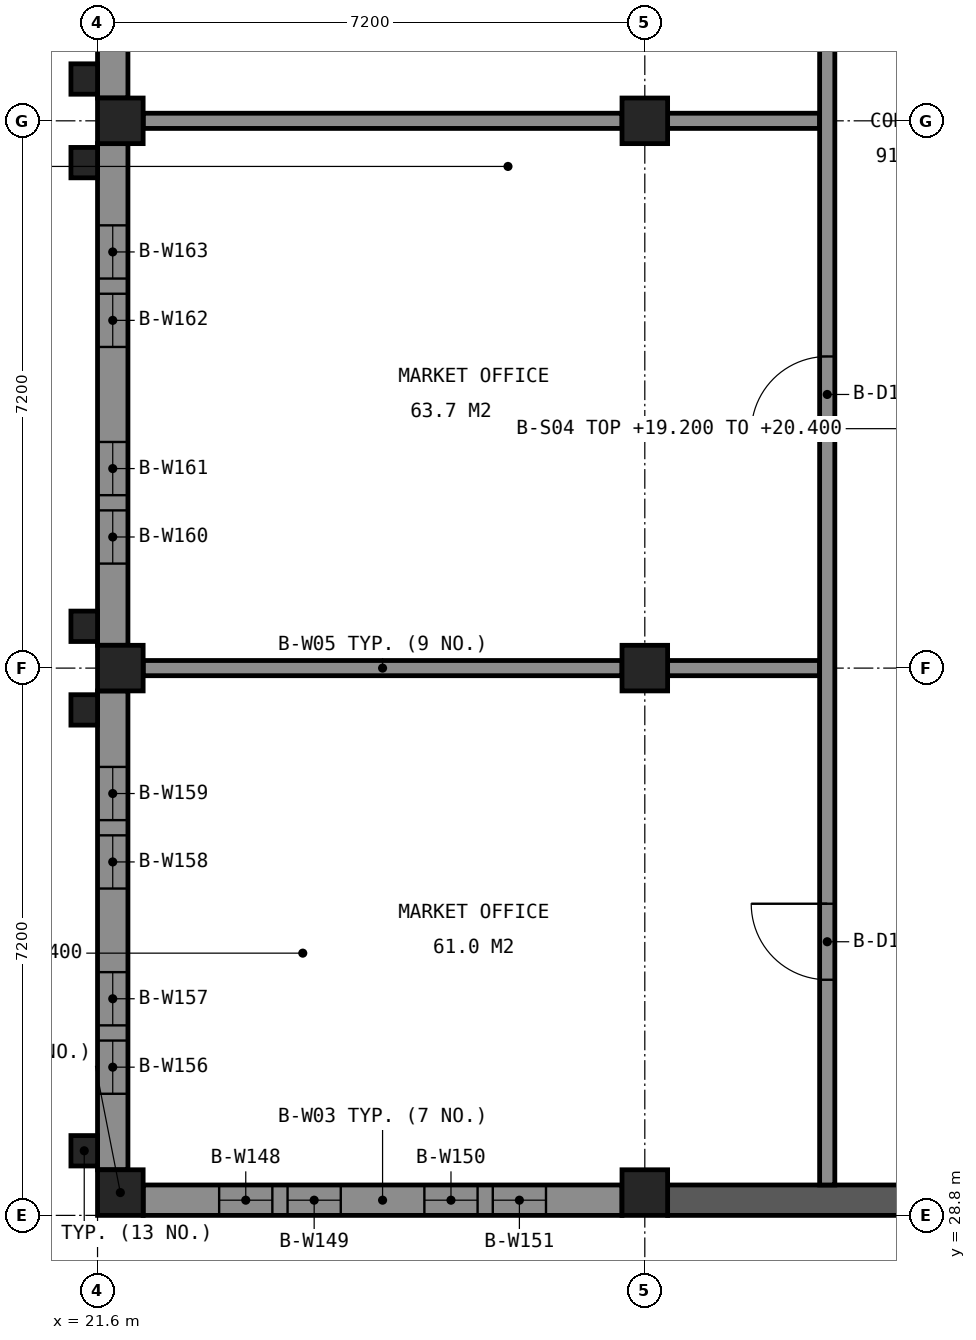
"""IFC4 building model, lengths in metres.
Left out: names, types, materials, properties, quantities, classifications, styles, units other than length and angle.
Written with IfcOpenShell. Run it as: python <this file> out.ifc"""

import sys

from ifc_helpers import new_model, si_unit, direction, frame, frame_2d, origin, origin_2d, place, context, subcontext, project, spatial, polyline, rectangle, outline, extrude, element, fill, save


model = new_model("IFC4")
c1 = context("Model", 3, precision=1e-05, world=origin(), true_north=direction((0.0, 1.0)))
c2 = subcontext(c1, "Body", "Model", "MODEL_VIEW")
j1 = project(units=[si_unit("LENGTHUNIT", "METRE"), si_unit("PLANEANGLEUNIT", "RADIAN")], contexts=[c1])
p1 = place(None, origin())
s1 = spatial("IfcSite", under=j1, at=p1, CompositionType="ELEMENT")
p2 = place(p1, origin())
s2 = spatial("IfcBuilding", under=s1, at=p2, CompositionType="ELEMENT")
p3 = place(p2, frame((0.0, 0.0, 14.4)))
s3 = spatial("IfcBuildingStorey", under=s2, at=p3, CompositionType="ELEMENT", Elevation=14.4)
for number, where, z_axis, x_axis in (
    (1, (21.9, 29.1, 0.0), (0.0, 0.0, 1.0), (1.0, 0.0, 0.0)),
    (2, (21.9, 36.0, 0.0), (0.0, 0.0, 1.0), (1.0, 0.0, 0.0)),
    (3, (21.9, 43.2, 0.0), (0.0, 0.0, 1.0), (1.0, 0.0, 0.0)),
):
    element("IfcColumn", number, at=place(p3, frame(where, z_axis=z_axis, x_axis=x_axis)), inside=s3, PredefinedType="COLUMN", context=c2, shape_type="SweptSolid", body=[
        extrude(rectangle(XDim=0.6, YDim=0.6, at=origin_2d()), origin(), (0.0, 0.0, 1.0), 4.144),
    ])
for number, where, z_axis, x_axis in (
    (4, (28.8, 29.1, 0.0), (0.0, 0.0, 1.0), (1.0, 0.0, 0.0)),
    (5, (28.8, 36.0, 0.0), (0.0, 0.0, 1.0), (1.0, 0.0, 0.0)),
    (6, (28.8, 43.2, 0.0), (0.0, 0.0, 1.0), (1.0, 0.0, 0.0)),
):
    element("IfcColumn", number, at=place(p3, frame(where, z_axis=z_axis, x_axis=x_axis)), inside=s3, PredefinedType="COLUMN", context=c2, shape_type="SweptSolid", body=[
        extrude(rectangle(XDim=0.6, YDim=0.6, at=origin_2d()), origin(), (0.0, 0.0, 1.0), 4.911),
    ])
p4 = place(p3, frame((29.1, 29.0, 0.0), z_axis=(0.0, 0.0, 1.0), x_axis=(1.0, 0.0, 0.0)))
e7 = element("IfcWall", 7, at=p4, inside=s3, PredefinedType="SHEAR", context=c2, shape_type="SweptSolid", body=[
    extrude(outline(polyline([(0.0, 0.0), (13.7, 0.0), (13.7, 4.155), (3.3, 5.311), (0.0, 4.944), (0.0, 0.0)])), frame((0.0, 0.2, 0.0), z_axis=(0.0, -1.0, 0.0), x_axis=(1.0, 0.0, 0.0)), (0.0, 0.0, 1.0), 0.4),
])
p5 = place(p3, frame((22.2, 29.0, 0.0), z_axis=(0.0, 0.0, 1.0), x_axis=(1.0, 0.0, 0.0)))
e8 = element("IfcWall", 8, at=p5, inside=s3, PredefinedType="SOLIDWALL", context=c2, shape_type="SweptSolid", body=[
    extrude(outline(polyline([(0.0, 0.0), (6.3, 0.0), (6.3, 4.878), (0.0, 4.177), (0.0, 0.0)])), frame((0.0, 0.2, 0.0), z_axis=(0.0, -1.0, 0.0), x_axis=(1.0, 0.0, 0.0)), (0.0, 0.0, 1.0), 0.4),
])
p6 = place(p5, frame((1.0, 0.0, 1.6)))
e9 = element("IfcOpeningElement", 9, at=p6, cuts=e8, PredefinedType="OPENING", context=c2, shape_type="SweptSolid", body=[
    extrude(rectangle(XDim=0.7, YDim=1.2, at=frame_2d((0.35, 0.6))), frame((0.0, 0.21, 0.0), z_axis=(0.0, -1.0, 0.0), x_axis=(1.0, 0.0, 0.0)), (0.0, 0.0, 1.0), 0.42),
])
p7 = place(p5, frame((1.9, 0.0, 1.6)))
e10 = element("IfcOpeningElement", 10, at=p7, cuts=e8, PredefinedType="OPENING", context=c2, shape_type="SweptSolid", body=[
    extrude(rectangle(XDim=0.7, YDim=1.2, at=frame_2d((0.35, 0.6))), frame((0.0, 0.21, 0.0), z_axis=(0.0, -1.0, 0.0), x_axis=(1.0, 0.0, 0.0)), (0.0, 0.0, 1.0), 0.42),
])
p8 = place(p5, frame((3.7, 0.0, 1.6)))
e11 = element("IfcOpeningElement", 11, at=p8, cuts=e8, PredefinedType="OPENING", context=c2, shape_type="SweptSolid", body=[
    extrude(rectangle(XDim=0.7, YDim=1.2, at=frame_2d((0.35, 0.6))), frame((0.0, 0.21, 0.0), z_axis=(0.0, -1.0, 0.0), x_axis=(1.0, 0.0, 0.0)), (0.0, 0.0, 1.0), 0.42),
])
p9 = place(p5, frame((4.6, 0.0, 1.6)))
e12 = element("IfcOpeningElement", 12, at=p9, cuts=e8, PredefinedType="OPENING", context=c2, shape_type="SweptSolid", body=[
    extrude(rectangle(XDim=0.7, YDim=1.2, at=frame_2d((0.35, 0.6))), frame((0.0, 0.21, 0.0), z_axis=(0.0, -1.0, 0.0), x_axis=(1.0, 0.0, 0.0)), (0.0, 0.0, 1.0), 0.42),
])
p10 = place(p3, frame((21.8, 29.4, 0.0), z_axis=(0.0, 0.0, 1.0), x_axis=(0.0, 1.0, 0.0)))
e13 = element("IfcWall", 13, at=p10, inside=s3, PredefinedType="SOLIDWALL", context=c2, shape_type="SweptSolid", body=[
    extrude(rectangle(XDim=6.3, YDim=0.4, at=frame_2d((3.15, 0.0))), origin(), (0.0, 0.0, 1.0), 4.133),
])
p11 = place(p10, frame((1.0, 0.0, 1.6)))
e14 = element("IfcOpeningElement", 14, at=p11, cuts=e13, PredefinedType="OPENING", context=c2, shape_type="SweptSolid", body=[
    extrude(rectangle(XDim=0.7, YDim=1.2, at=frame_2d((0.35, 0.6))), frame((0.0, 0.21, 0.0), z_axis=(0.0, -1.0, 0.0), x_axis=(1.0, 0.0, 0.0)), (0.0, 0.0, 1.0), 0.42),
])
p12 = place(p10, frame((1.9, 0.0, 1.6)))
e15 = element("IfcOpeningElement", 15, at=p12, cuts=e13, PredefinedType="OPENING", context=c2, shape_type="SweptSolid", body=[
    extrude(rectangle(XDim=0.7, YDim=1.2, at=frame_2d((0.35, 0.6))), frame((0.0, 0.21, 0.0), z_axis=(0.0, -1.0, 0.0), x_axis=(1.0, 0.0, 0.0)), (0.0, 0.0, 1.0), 0.42),
])
p13 = place(p10, frame((3.7, 0.0, 1.6)))
e16 = element("IfcOpeningElement", 16, at=p13, cuts=e13, PredefinedType="OPENING", context=c2, shape_type="SweptSolid", body=[
    extrude(rectangle(XDim=0.7, YDim=1.2, at=frame_2d((0.35, 0.6))), frame((0.0, 0.21, 0.0), z_axis=(0.0, -1.0, 0.0), x_axis=(1.0, 0.0, 0.0)), (0.0, 0.0, 1.0), 0.42),
])
p14 = place(p10, frame((4.6, 0.0, 1.6)))
e17 = element("IfcOpeningElement", 17, at=p14, cuts=e13, PredefinedType="OPENING", context=c2, shape_type="SweptSolid", body=[
    extrude(rectangle(XDim=0.7, YDim=1.2, at=frame_2d((0.35, 0.6))), frame((0.0, 0.21, 0.0), z_axis=(0.0, -1.0, 0.0), x_axis=(1.0, 0.0, 0.0)), (0.0, 0.0, 1.0), 0.42),
])
p15 = place(p3, frame((21.8, 36.3, 0.0), z_axis=(0.0, 0.0, 1.0), x_axis=(0.0, 1.0, 0.0)))
e18 = element("IfcWall", 18, at=p15, inside=s3, PredefinedType="SOLIDWALL", context=c2, shape_type="SweptSolid", body=[
    extrude(rectangle(XDim=6.6, YDim=0.4, at=frame_2d((3.3, 0.0))), origin(), (0.0, 0.0, 1.0), 4.133),
])
p16 = place(p15, frame((1.075, 0.0, 1.6)))
e19 = element("IfcOpeningElement", 19, at=p16, cuts=e18, PredefinedType="OPENING", context=c2, shape_type="SweptSolid", body=[
    extrude(rectangle(XDim=0.7, YDim=1.2, at=frame_2d((0.35, 0.6))), frame((0.0, 0.21, 0.0), z_axis=(0.0, -1.0, 0.0), x_axis=(1.0, 0.0, 0.0)), (0.0, 0.0, 1.0), 0.42),
])
p17 = place(p15, frame((1.975, 0.0, 1.6)))
e20 = element("IfcOpeningElement", 20, at=p17, cuts=e18, PredefinedType="OPENING", context=c2, shape_type="SweptSolid", body=[
    extrude(rectangle(XDim=0.7, YDim=1.2, at=frame_2d((0.35, 0.6))), frame((0.0, 0.21, 0.0), z_axis=(0.0, -1.0, 0.0), x_axis=(1.0, 0.0, 0.0)), (0.0, 0.0, 1.0), 0.42),
])
p18 = place(p15, frame((3.925, 0.0, 1.6)))
e21 = element("IfcOpeningElement", 21, at=p18, cuts=e18, PredefinedType="OPENING", context=c2, shape_type="SweptSolid", body=[
    extrude(rectangle(XDim=0.7, YDim=1.2, at=frame_2d((0.35, 0.6))), frame((0.0, 0.21, 0.0), z_axis=(0.0, -1.0, 0.0), x_axis=(1.0, 0.0, 0.0)), (0.0, 0.0, 1.0), 0.42),
])
p19 = place(p15, frame((4.825, 0.0, 1.6)))
e22 = element("IfcOpeningElement", 22, at=p19, cuts=e18, PredefinedType="OPENING", context=c2, shape_type="SweptSolid", body=[
    extrude(rectangle(XDim=0.7, YDim=1.2, at=frame_2d((0.35, 0.6))), frame((0.0, 0.21, 0.0), z_axis=(0.0, -1.0, 0.0), x_axis=(1.0, 0.0, 0.0)), (0.0, 0.0, 1.0), 0.42),
])
p20 = place(p3, frame((21.8, 43.5, 0.0), z_axis=(0.0, 0.0, 1.0), x_axis=(0.0, 1.0, 0.0)))
e23 = element("IfcWall", 23, at=p20, inside=s3, PredefinedType="SOLIDWALL", context=c2, shape_type="SweptSolid", body=[
    extrude(rectangle(XDim=6.6, YDim=0.4, at=frame_2d((3.3, 0.0))), origin(), (0.0, 0.0, 1.0), 4.133),
])
p21 = place(p20, frame((1.075, 0.0, 1.6)))
e24 = element("IfcOpeningElement", 24, at=p21, cuts=e23, PredefinedType="OPENING", context=c2, shape_type="SweptSolid", body=[
    extrude(rectangle(XDim=0.7, YDim=1.2, at=frame_2d((0.35, 0.6))), frame((0.0, 0.21, 0.0), z_axis=(0.0, -1.0, 0.0), x_axis=(1.0, 0.0, 0.0)), (0.0, 0.0, 1.0), 0.42),
])
p22 = place(p20, frame((1.975, 0.0, 1.6)))
e25 = element("IfcOpeningElement", 25, at=p22, cuts=e23, PredefinedType="OPENING", context=c2, shape_type="SweptSolid", body=[
    extrude(rectangle(XDim=0.7, YDim=1.2, at=frame_2d((0.35, 0.6))), frame((0.0, 0.21, 0.0), z_axis=(0.0, -1.0, 0.0), x_axis=(1.0, 0.0, 0.0)), (0.0, 0.0, 1.0), 0.42),
])
p23 = place(p20, frame((3.925, 0.0, 1.6)))
e26 = element("IfcOpeningElement", 26, at=p23, cuts=e23, PredefinedType="OPENING", context=c2, shape_type="SweptSolid", body=[
    extrude(rectangle(XDim=0.7, YDim=1.2, at=frame_2d((0.35, 0.6))), frame((0.0, 0.21, 0.0), z_axis=(0.0, -1.0, 0.0), x_axis=(1.0, 0.0, 0.0)), (0.0, 0.0, 1.0), 0.42),
])
p24 = place(p20, frame((4.825, 0.0, 1.6)))
e27 = element("IfcOpeningElement", 27, at=p24, cuts=e23, PredefinedType="OPENING", context=c2, shape_type="SweptSolid", body=[
    extrude(rectangle(XDim=0.7, YDim=1.2, at=frame_2d((0.35, 0.6))), frame((0.0, 0.21, 0.0), z_axis=(0.0, -1.0, 0.0), x_axis=(1.0, 0.0, 0.0)), (0.0, 0.0, 1.0), 0.42),
])
for number, where, z_axis, x_axis in (
    (28, (21.425, 29.65, 0.0), (0.0, 0.0, 1.0), (1.0, 0.0, 0.0)),
    (29, (21.425, 35.45, 0.0), (0.0, 0.0, 1.0), (1.0, 0.0, 0.0)),
    (30, (21.425, 36.55, 0.0), (0.0, 0.0, 1.0), (1.0, 0.0, 0.0)),
    (31, (21.425, 42.65, 0.0), (0.0, 0.0, 1.0), (1.0, 0.0, 0.0)),
    (32, (21.425, 43.75, 0.0), (0.0, 0.0, 1.0), (1.0, 0.0, 0.0)),
):
    element("IfcColumn", number, at=place(p3, frame(where, z_axis=z_axis, x_axis=x_axis)), inside=s3, PredefinedType="COLUMN", context=c2, shape_type="SweptSolid", body=[
        extrude(rectangle(XDim=0.35, YDim=0.4, at=origin_2d()), origin(), (0.0, 0.0, 1.0), 4.1),
    ])
p25 = place(p3, frame((22.2, 36.0, 0.0), z_axis=(0.0, 0.0, 1.0), x_axis=(1.0, 0.0, 0.0)))
e33 = element("IfcWall", 33, at=p25, inside=s3, PredefinedType="PARTITIONING", context=c2, shape_type="SweptSolid", body=[
    extrude(rectangle(XDim=6.3, YDim=0.2, at=frame_2d((3.15, 0.0))), origin(), (0.0, 0.0, 1.0), 4.0),
])
p26 = place(p3, frame((29.1, 36.0, 0.0), z_axis=(0.0, 0.0, 1.0), x_axis=(1.0, 0.0, 0.0)))
e34 = element("IfcWall", 34, at=p26, inside=s3, PredefinedType="PARTITIONING", context=c2, shape_type="SweptSolid", body=[
    extrude(rectangle(XDim=2.0, YDim=0.2, at=frame_2d((1.0, 0.0))), origin(), (0.0, 0.0, 1.0), 4.0),
])
p27 = place(p3, frame((22.2, 43.2, 0.0), z_axis=(0.0, 0.0, 1.0), x_axis=(1.0, 0.0, 0.0)))
e35 = element("IfcWall", 35, at=p27, inside=s3, PredefinedType="PARTITIONING", context=c2, shape_type="SweptSolid", body=[
    extrude(rectangle(XDim=6.3, YDim=0.2, at=frame_2d((3.15, 0.0))), origin(), (0.0, 0.0, 1.0), 4.0),
])
p28 = place(p3, frame((29.1, 43.2, 0.0), z_axis=(0.0, 0.0, 1.0), x_axis=(1.0, 0.0, 0.0)))
e36 = element("IfcWall", 36, at=p28, inside=s3, PredefinedType="PARTITIONING", context=c2, shape_type="SweptSolid", body=[
    extrude(rectangle(XDim=2.0, YDim=0.2, at=frame_2d((1.0, 0.0))), origin(), (0.0, 0.0, 1.0), 4.0),
])
p29 = place(p3, frame((31.2, 29.2, 0.0), z_axis=(0.0, 0.0, 1.0), x_axis=(0.0, 1.0, 0.0)))
e37 = element("IfcWall", 37, at=p29, inside=s3, PredefinedType="PARTITIONING", context=c2, shape_type="SweptSolid", body=[
    extrude(rectangle(XDim=42.4, YDim=0.2, at=frame_2d((21.2, 0.0))), origin(), (0.0, 0.0, 1.0), 4.0),
])
p30 = place(p29, frame((2.7, 0.0, 0.0)))
e38 = element("IfcOpeningElement", 38, at=p30, cuts=e37, PredefinedType="OPENING", context=c2, shape_type="SweptSolid", body=[
    extrude(rectangle(XDim=1.0, YDim=2.1, at=frame_2d((0.5, 1.05))), frame((0.0, 0.11, 0.0), z_axis=(0.0, -1.0, 0.0), x_axis=(1.0, 0.0, 0.0)), (0.0, 0.0, 1.0), 0.22),
])
p31 = place(p29, frame((9.9, 0.0, 0.0)))
e39 = element("IfcOpeningElement", 39, at=p31, cuts=e37, PredefinedType="OPENING", context=c2, shape_type="SweptSolid", body=[
    extrude(rectangle(XDim=1.0, YDim=2.1, at=frame_2d((0.5, 1.05))), frame((0.0, 0.11, 0.0), z_axis=(0.0, -1.0, 0.0), x_axis=(1.0, 0.0, 0.0)), (0.0, 0.0, 1.0), 0.22),
])
p32 = place(p29, frame((17.1, 0.0, 0.0)))
e40 = element("IfcOpeningElement", 40, at=p32, cuts=e37, PredefinedType="OPENING", context=c2, shape_type="SweptSolid", body=[
    extrude(rectangle(XDim=1.0, YDim=2.1, at=frame_2d((0.5, 1.05))), frame((0.0, 0.11, 0.0), z_axis=(0.0, -1.0, 0.0), x_axis=(1.0, 0.0, 0.0)), (0.0, 0.0, 1.0), 0.22),
])
p33 = place(p29, frame((24.3, 0.0, 0.0)))
e41 = element("IfcOpeningElement", 41, at=p33, cuts=e37, PredefinedType="OPENING", context=c2, shape_type="SweptSolid", body=[
    extrude(rectangle(XDim=1.0, YDim=2.1, at=frame_2d((0.5, 1.05))), frame((0.0, 0.11, 0.0), z_axis=(0.0, -1.0, 0.0), x_axis=(1.0, 0.0, 0.0)), (0.0, 0.0, 1.0), 0.22),
])
p34 = place(p29, frame((31.5, 0.0, 0.0)))
e42 = element("IfcOpeningElement", 42, at=p34, cuts=e37, PredefinedType="OPENING", context=c2, shape_type="SweptSolid", body=[
    extrude(rectangle(XDim=1.0, YDim=2.1, at=frame_2d((0.5, 1.05))), frame((0.0, 0.11, 0.0), z_axis=(0.0, -1.0, 0.0), x_axis=(1.0, 0.0, 0.0)), (0.0, 0.0, 1.0), 0.22),
])
p35 = place(p29, frame((38.7, 0.0, 0.0)))
e43 = element("IfcOpeningElement", 43, at=p35, cuts=e37, PredefinedType="OPENING", context=c2, shape_type="SweptSolid", body=[
    extrude(rectangle(XDim=1.0, YDim=2.1, at=frame_2d((0.5, 1.05))), frame((0.0, 0.11, 0.0), z_axis=(0.0, -1.0, 0.0), x_axis=(1.0, 0.0, 0.0)), (0.0, 0.0, 1.0), 0.22),
])
p36 = place(p6, origin())
e44 = element("IfcWindow", 44, at=p36, inside=s3, PartitioningType="SINGLE_PANEL", PredefinedType="WINDOW", context=c2, shape_type="SweptSolid", body=[
    extrude(rectangle(XDim=0.7, YDim=1.2, at=frame_2d((0.35, 0.6))), frame((0.0, 0.03, 0.0), z_axis=(0.0, -1.0, 0.0), x_axis=(1.0, 0.0, 0.0)), (0.0, 0.0, 1.0), 0.06),
])
fill(e9, e44)
p37 = place(p7, origin())
e45 = element("IfcWindow", 45, at=p37, inside=s3, PartitioningType="SINGLE_PANEL", PredefinedType="WINDOW", context=c2, shape_type="SweptSolid", body=[
    extrude(rectangle(XDim=0.7, YDim=1.2, at=frame_2d((0.35, 0.6))), frame((0.0, 0.03, 0.0), z_axis=(0.0, -1.0, 0.0), x_axis=(1.0, 0.0, 0.0)), (0.0, 0.0, 1.0), 0.06),
])
fill(e10, e45)
p38 = place(p8, origin())
e46 = element("IfcWindow", 46, at=p38, inside=s3, PartitioningType="SINGLE_PANEL", PredefinedType="WINDOW", context=c2, shape_type="SweptSolid", body=[
    extrude(rectangle(XDim=0.7, YDim=1.2, at=frame_2d((0.35, 0.6))), frame((0.0, 0.03, 0.0), z_axis=(0.0, -1.0, 0.0), x_axis=(1.0, 0.0, 0.0)), (0.0, 0.0, 1.0), 0.06),
])
fill(e11, e46)
p39 = place(p9, origin())
e47 = element("IfcWindow", 47, at=p39, inside=s3, PartitioningType="SINGLE_PANEL", PredefinedType="WINDOW", context=c2, shape_type="SweptSolid", body=[
    extrude(rectangle(XDim=0.7, YDim=1.2, at=frame_2d((0.35, 0.6))), frame((0.0, 0.03, 0.0), z_axis=(0.0, -1.0, 0.0), x_axis=(1.0, 0.0, 0.0)), (0.0, 0.0, 1.0), 0.06),
])
fill(e12, e47)
p40 = place(p11, origin())
e48 = element("IfcWindow", 48, at=p40, inside=s3, PartitioningType="SINGLE_PANEL", PredefinedType="WINDOW", context=c2, shape_type="SweptSolid", body=[
    extrude(rectangle(XDim=0.7, YDim=1.2, at=frame_2d((0.35, 0.6))), frame((0.0, 0.03, 0.0), z_axis=(0.0, -1.0, 0.0), x_axis=(1.0, 0.0, 0.0)), (0.0, 0.0, 1.0), 0.06),
])
fill(e14, e48)
p41 = place(p12, origin())
e49 = element("IfcWindow", 49, at=p41, inside=s3, PartitioningType="SINGLE_PANEL", PredefinedType="WINDOW", context=c2, shape_type="SweptSolid", body=[
    extrude(rectangle(XDim=0.7, YDim=1.2, at=frame_2d((0.35, 0.6))), frame((0.0, 0.03, 0.0), z_axis=(0.0, -1.0, 0.0), x_axis=(1.0, 0.0, 0.0)), (0.0, 0.0, 1.0), 0.06),
])
fill(e15, e49)
p42 = place(p13, origin())
e50 = element("IfcWindow", 50, at=p42, inside=s3, PartitioningType="SINGLE_PANEL", PredefinedType="WINDOW", context=c2, shape_type="SweptSolid", body=[
    extrude(rectangle(XDim=0.7, YDim=1.2, at=frame_2d((0.35, 0.6))), frame((0.0, 0.03, 0.0), z_axis=(0.0, -1.0, 0.0), x_axis=(1.0, 0.0, 0.0)), (0.0, 0.0, 1.0), 0.06),
])
fill(e16, e50)
p43 = place(p14, origin())
e51 = element("IfcWindow", 51, at=p43, inside=s3, PartitioningType="SINGLE_PANEL", PredefinedType="WINDOW", context=c2, shape_type="SweptSolid", body=[
    extrude(rectangle(XDim=0.7, YDim=1.2, at=frame_2d((0.35, 0.6))), frame((0.0, 0.03, 0.0), z_axis=(0.0, -1.0, 0.0), x_axis=(1.0, 0.0, 0.0)), (0.0, 0.0, 1.0), 0.06),
])
fill(e17, e51)
p44 = place(p16, origin())
e52 = element("IfcWindow", 52, at=p44, inside=s3, PartitioningType="SINGLE_PANEL", PredefinedType="WINDOW", context=c2, shape_type="SweptSolid", body=[
    extrude(rectangle(XDim=0.7, YDim=1.2, at=frame_2d((0.35, 0.6))), frame((0.0, 0.03, 0.0), z_axis=(0.0, -1.0, 0.0), x_axis=(1.0, 0.0, 0.0)), (0.0, 0.0, 1.0), 0.06),
])
fill(e19, e52)
p45 = place(p17, origin())
e53 = element("IfcWindow", 53, at=p45, inside=s3, PartitioningType="SINGLE_PANEL", PredefinedType="WINDOW", context=c2, shape_type="SweptSolid", body=[
    extrude(rectangle(XDim=0.7, YDim=1.2, at=frame_2d((0.35, 0.6))), frame((0.0, 0.03, 0.0), z_axis=(0.0, -1.0, 0.0), x_axis=(1.0, 0.0, 0.0)), (0.0, 0.0, 1.0), 0.06),
])
fill(e20, e53)
p46 = place(p18, origin())
e54 = element("IfcWindow", 54, at=p46, inside=s3, PartitioningType="SINGLE_PANEL", PredefinedType="WINDOW", context=c2, shape_type="SweptSolid", body=[
    extrude(rectangle(XDim=0.7, YDim=1.2, at=frame_2d((0.35, 0.6))), frame((0.0, 0.03, 0.0), z_axis=(0.0, -1.0, 0.0), x_axis=(1.0, 0.0, 0.0)), (0.0, 0.0, 1.0), 0.06),
])
fill(e21, e54)
p47 = place(p19, origin())
e55 = element("IfcWindow", 55, at=p47, inside=s3, PartitioningType="SINGLE_PANEL", PredefinedType="WINDOW", context=c2, shape_type="SweptSolid", body=[
    extrude(rectangle(XDim=0.7, YDim=1.2, at=frame_2d((0.35, 0.6))), frame((0.0, 0.03, 0.0), z_axis=(0.0, -1.0, 0.0), x_axis=(1.0, 0.0, 0.0)), (0.0, 0.0, 1.0), 0.06),
])
fill(e22, e55)
p48 = place(p30, origin())
e56 = element("IfcDoor", 56, at=p48, inside=s3, OperationType="SINGLE_SWING_RIGHT", PredefinedType="DOOR", context=c2, shape_type="SweptSolid", body=[
    extrude(rectangle(XDim=1.0, YDim=2.1, at=frame_2d((0.5, 1.05))), frame((0.0, 0.025, 0.0), z_axis=(0.0, -1.0, 0.0), x_axis=(1.0, 0.0, 0.0)), (0.0, 0.0, 1.0), 0.05),
])
fill(e38, e56)
p49 = place(p31, origin())
e57 = element("IfcDoor", 57, at=p49, inside=s3, OperationType="SINGLE_SWING_LEFT", PredefinedType="DOOR", context=c2, shape_type="SweptSolid", body=[
    extrude(rectangle(XDim=1.0, YDim=2.1, at=frame_2d((0.5, 1.05))), frame((0.0, 0.025, 0.0), z_axis=(0.0, -1.0, 0.0), x_axis=(1.0, 0.0, 0.0)), (0.0, 0.0, 1.0), 0.05),
])
fill(e39, e57)
save(model, sys.argv[1])
